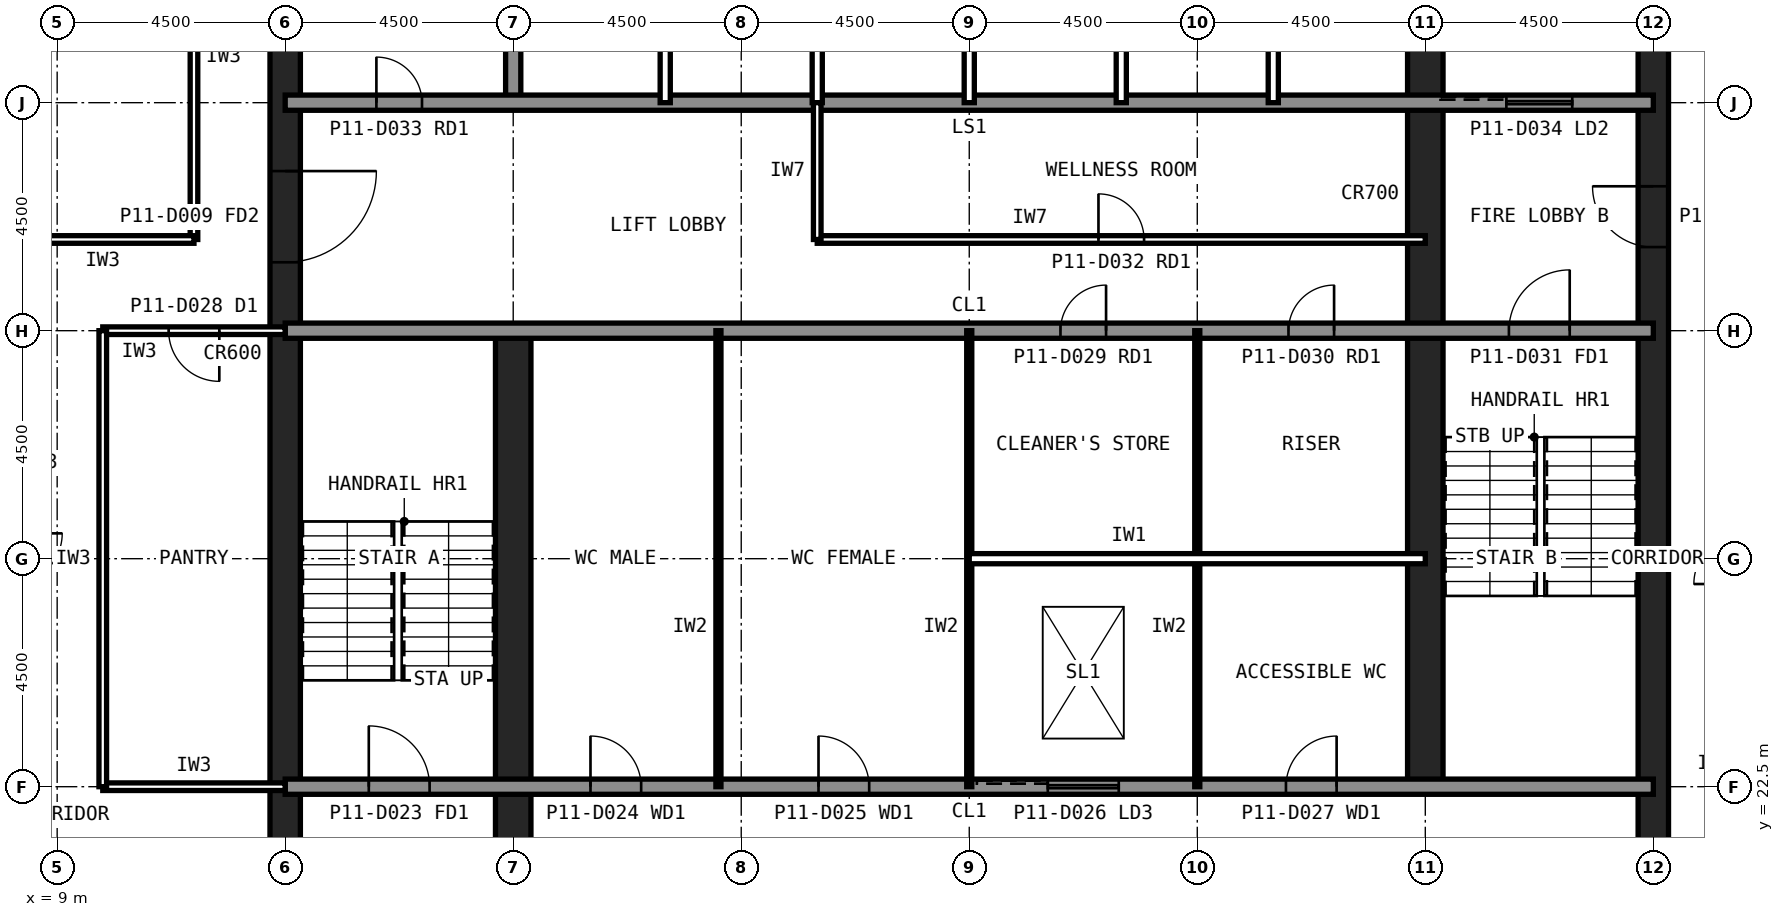
"""IFC4 building model, lengths in metres.
Left out: names, types, materials, properties, quantities, classifications, styles, units other than length and angle.
Written with IfcOpenShell. Run it as: python <this file> out.ifc"""

import sys

from ifc_helpers import new_model, si_unit, direction, frame, frame_2d, origin, place, context, subcontext, project, spatial, rectangle, extrude, element, fill, save


model = new_model("IFC4")
c1 = context("Model", 3, precision=1e-05, world=origin(), true_north=direction((0.0, 1.0)))
c2 = subcontext(c1, "Body", "Model", "MODEL_VIEW")
j1 = project(units=[si_unit("LENGTHUNIT", "METRE"), si_unit("PLANEANGLEUNIT", "RADIAN")], contexts=[c1])
p1 = place(None, origin())
s1 = spatial("IfcSite", under=j1, at=p1, CompositionType="ELEMENT")
p2 = place(p1, origin())
s2 = spatial("IfcBuilding", under=s1, at=p2, CompositionType="ELEMENT")
p3 = place(p2, frame((0.0, 0.0, 45.8)))
s3 = spatial("IfcBuildingStorey", under=s2, at=p3, CompositionType="ELEMENT", Elevation=45.8)
p4 = place(p3, frame((40.5, 13.5, 0.0), z_axis=(0.0, 0.0, 1.0), x_axis=(0.0, 1.0, 0.0)))
e1 = element("IfcWall", 1, at=p4, inside=s3, PredefinedType="SHEAR", context=c2, shape_type="SweptSolid", body=[
    extrude(rectangle(XDim=27.0, YDim=0.6, at=frame_2d((13.5, 0.0))), origin(), (0.0, 0.0, 1.0), 4.2),
])
p5 = place(p4, frame((5.85, 0.0, 0.0)))
e2 = element("IfcOpeningElement", 2, at=p5, cuts=e1, PredefinedType="OPENING", context=c2, shape_type="SweptSolid", body=[
    extrude(rectangle(XDim=1.8, YDim=2.1, at=frame_2d((0.9, 1.05))), frame((0.0, 0.31, 0.0), z_axis=(0.0, -1.0, 0.0), x_axis=(1.0, 0.0, 0.0)), (0.0, 0.0, 1.0), 0.62),
])
p6 = place(p4, frame((19.65, 0.0, 0.0)))
e3 = element("IfcOpeningElement", 3, at=p6, cuts=e1, PredefinedType="OPENING", context=c2, shape_type="SweptSolid", body=[
    extrude(rectangle(XDim=1.2, YDim=2.1, at=frame_2d((0.6, 1.05))), frame((0.0, 0.31, 0.0), z_axis=(0.0, -1.0, 0.0), x_axis=(1.0, 0.0, 0.0)), (0.0, 0.0, 1.0), 0.62),
])
p7 = place(p3, frame((13.5, 40.5, 0.0), z_axis=(0.0, 0.0, 1.0), x_axis=(0.0, -1.0, 0.0)))
e4 = element("IfcWall", 4, at=p7, inside=s3, PredefinedType="SHEAR", context=c2, shape_type="SweptSolid", body=[
    extrude(rectangle(XDim=27.0, YDim=0.6, at=frame_2d((13.5, 0.0))), origin(), (0.0, 0.0, 1.0), 4.2),
])
p8 = place(p7, frame((19.65, 0.0, 0.0)))
e5 = element("IfcOpeningElement", 5, at=p8, cuts=e4, PredefinedType="OPENING", context=c2, shape_type="SweptSolid", body=[
    extrude(rectangle(XDim=1.2, YDim=2.1, at=frame_2d((0.6, 1.05))), frame((0.0, 0.31, 0.0), z_axis=(0.0, -1.0, 0.0), x_axis=(1.0, 0.0, 0.0)), (0.0, 0.0, 1.0), 0.62),
])
p9 = place(p7, frame((5.85, 0.0, 0.0)))
e6 = element("IfcOpeningElement", 6, at=p9, cuts=e4, PredefinedType="OPENING", context=c2, shape_type="SweptSolid", body=[
    extrude(rectangle(XDim=1.8, YDim=2.1, at=frame_2d((0.9, 1.05))), frame((0.0, 0.31, 0.0), z_axis=(0.0, -1.0, 0.0), x_axis=(1.0, 0.0, 0.0)), (0.0, 0.0, 1.0), 0.62),
])
p10 = place(p3, frame((18.0, 13.5, 0.0), z_axis=(0.0, 0.0, 1.0), x_axis=(0.0, 1.0, 0.0)))
e7 = element("IfcWall", 7, at=p10, inside=s3, PredefinedType="SHEAR", context=c2, shape_type="SweptSolid", body=[
    extrude(rectangle(XDim=18.0, YDim=0.7, at=frame_2d((9.0, 0.0))), origin(), (0.0, 0.0, 1.0), 4.2),
])
p11 = place(p3, frame((18.0, 36.0, 0.0), z_axis=(0.0, 0.0, 1.0), x_axis=(0.0, 1.0, 0.0)))
e8 = element("IfcWall", 8, at=p11, inside=s3, PredefinedType="SOLIDWALL", context=c2, shape_type="SweptSolid", body=[
    extrude(rectangle(XDim=4.5, YDim=0.3, at=frame_2d((2.25, 0.0))), origin(), (0.0, 0.0, 1.0), 4.04),
])
p12 = place(p3, frame((36.0, 22.5, 0.0), z_axis=(0.0, 0.0, 1.0), x_axis=(0.0, 1.0, 0.0)))
e9 = element("IfcWall", 9, at=p12, inside=s3, PredefinedType="SHEAR", context=c2, shape_type="SweptSolid", body=[
    extrude(rectangle(XDim=18.0, YDim=0.7, at=frame_2d((9.0, 0.0))), origin(), (0.0, 0.0, 1.0), 4.2),
])
p13 = place(p3, frame((13.5, 36.0, 0.0), z_axis=(0.0, 0.0, 1.0), x_axis=(1.0, 0.0, 0.0)))
e10 = element("IfcWall", 10, at=p13, inside=s3, PredefinedType="SOLIDWALL", context=c2, shape_type="SweptSolid", body=[
    extrude(rectangle(XDim=27.0, YDim=0.3, at=frame_2d((13.5, 0.0))), origin(), (0.0, 0.0, 1.0), 4.04),
])
p14 = place(p13, frame((1.8, 0.0, 0.0)))
e11 = element("IfcOpeningElement", 11, at=p14, cuts=e10, PredefinedType="OPENING", context=c2, shape_type="SweptSolid", body=[
    extrude(rectangle(XDim=0.9, YDim=2.1, at=frame_2d((0.45, 1.05))), frame((0.0, 0.16, 0.0), z_axis=(0.0, -1.0, 0.0), x_axis=(1.0, 0.0, 0.0)), (0.0, 0.0, 1.0), 0.32),
])
p15 = place(p13, frame((24.1, 0.0, 0.0)))
e12 = element("IfcOpeningElement", 12, at=p15, cuts=e10, PredefinedType="OPENING", context=c2, shape_type="SweptSolid", body=[
    extrude(rectangle(XDim=1.3, YDim=2.2, at=frame_2d((0.65, 1.1))), frame((0.0, 0.16, 0.0), z_axis=(0.0, -1.0, 0.0), x_axis=(1.0, 0.0, 0.0)), (0.0, 0.0, 1.0), 0.32),
])
p16 = place(p3, frame((13.5, 22.5, 0.0), z_axis=(0.0, 0.0, 1.0), x_axis=(1.0, 0.0, 0.0)))
e13 = element("IfcWall", 13, at=p16, inside=s3, PredefinedType="SOLIDWALL", context=c2, shape_type="SweptSolid", body=[
    extrude(rectangle(XDim=27.0, YDim=0.3, at=frame_2d((13.5, 0.0))), origin(), (0.0, 0.0, 1.0), 4.04),
])
p17 = place(p16, frame((1.65, 0.0, 0.0)))
e14 = element("IfcOpeningElement", 14, at=p17, cuts=e13, PredefinedType="OPENING", context=c2, shape_type="SweptSolid", body=[
    extrude(rectangle(XDim=1.2, YDim=2.1, at=frame_2d((0.6, 1.05))), frame((0.0, 0.16, 0.0), z_axis=(0.0, -1.0, 0.0), x_axis=(1.0, 0.0, 0.0)), (0.0, 0.0, 1.0), 0.32),
])
p18 = place(p16, frame((6.025, 0.0, 0.0)))
e15 = element("IfcOpeningElement", 15, at=p18, cuts=e13, PredefinedType="OPENING", context=c2, shape_type="SweptSolid", body=[
    extrude(rectangle(XDim=1.0, YDim=2.1, at=frame_2d((0.5, 1.05))), frame((0.0, 0.16, 0.0), z_axis=(0.0, -1.0, 0.0), x_axis=(1.0, 0.0, 0.0)), (0.0, 0.0, 1.0), 0.32),
])
p19 = place(p16, frame((10.525, 0.0, 0.0)))
e16 = element("IfcOpeningElement", 16, at=p19, cuts=e13, PredefinedType="OPENING", context=c2, shape_type="SweptSolid", body=[
    extrude(rectangle(XDim=1.0, YDim=2.1, at=frame_2d((0.5, 1.05))), frame((0.0, 0.16, 0.0), z_axis=(0.0, -1.0, 0.0), x_axis=(1.0, 0.0, 0.0)), (0.0, 0.0, 1.0), 0.32),
])
p20 = place(p16, frame((19.75, 0.0, 0.0)))
e17 = element("IfcOpeningElement", 17, at=p20, cuts=e13, PredefinedType="OPENING", context=c2, shape_type="SweptSolid", body=[
    extrude(rectangle(XDim=1.0, YDim=2.1, at=frame_2d((0.5, 1.05))), frame((0.0, 0.16, 0.0), z_axis=(0.0, -1.0, 0.0), x_axis=(1.0, 0.0, 0.0)), (0.0, 0.0, 1.0), 0.32),
])
p21 = place(p16, frame((15.05, 0.0, 0.0)))
e18 = element("IfcOpeningElement", 18, at=p21, cuts=e13, PredefinedType="OPENING", context=c2, shape_type="SweptSolid", body=[
    extrude(rectangle(XDim=1.4, YDim=2.4, at=frame_2d((0.7, 1.2))), frame((0.0, 0.16, 0.0), z_axis=(0.0, -1.0, 0.0), x_axis=(1.0, 0.0, 0.0)), (0.0, 0.0, 1.0), 0.32),
])
p22 = place(p3, frame((13.5, 31.5, 0.0), z_axis=(0.0, 0.0, 1.0), x_axis=(1.0, 0.0, 0.0)))
e19 = element("IfcWall", 19, at=p22, inside=s3, PredefinedType="SOLIDWALL", context=c2, shape_type="SweptSolid", body=[
    extrude(rectangle(XDim=27.0, YDim=0.3, at=frame_2d((13.5, 0.0))), origin(), (0.0, 0.0, 1.0), 4.04),
])
p23 = place(p22, frame((24.15, 0.0, 0.0)))
e20 = element("IfcOpeningElement", 20, at=p23, cuts=e19, PredefinedType="OPENING", context=c2, shape_type="SweptSolid", body=[
    extrude(rectangle(XDim=1.2, YDim=2.1, at=frame_2d((0.6, 1.05))), frame((0.0, 0.16, 0.0), z_axis=(0.0, -1.0, 0.0), x_axis=(1.0, 0.0, 0.0)), (0.0, 0.0, 1.0), 0.32),
])
p24 = place(p22, frame((15.3, 0.0, 0.0)))
e21 = element("IfcOpeningElement", 21, at=p24, cuts=e19, PredefinedType="OPENING", context=c2, shape_type="SweptSolid", body=[
    extrude(rectangle(XDim=0.9, YDim=2.1, at=frame_2d((0.45, 1.05))), frame((0.0, 0.16, 0.0), z_axis=(0.0, -1.0, 0.0), x_axis=(1.0, 0.0, 0.0)), (0.0, 0.0, 1.0), 0.32),
])
p25 = place(p22, frame((19.8, 0.0, 0.0)))
e22 = element("IfcOpeningElement", 22, at=p25, cuts=e19, PredefinedType="OPENING", context=c2, shape_type="SweptSolid", body=[
    extrude(rectangle(XDim=0.9, YDim=2.1, at=frame_2d((0.45, 1.05))), frame((0.0, 0.16, 0.0), z_axis=(0.0, -1.0, 0.0), x_axis=(1.0, 0.0, 0.0)), (0.0, 0.0, 1.0), 0.32),
])
for number, where, z_axis, x_axis in (
    (23, (21.0, 36.0, 0.0), (0.0, 0.0, 1.0), (0.0, 1.0, 0.0)),
    (24, (24.0, 36.0, 0.0), (0.0, 0.0, 1.0), (0.0, 1.0, 0.0)),
    (25, (27.0, 36.0, 0.0), (0.0, 0.0, 1.0), (0.0, 1.0, 0.0)),
    (26, (30.0, 36.0, 0.0), (0.0, 0.0, 1.0), (0.0, 1.0, 0.0)),
    (27, (33.0, 36.0, 0.0), (0.0, 0.0, 1.0), (0.0, 1.0, 0.0)),
):
    element("IfcWall", number, at=place(p3, frame(where, z_axis=z_axis, x_axis=x_axis)), inside=s3, PredefinedType="PARTITIONING", context=c2, shape_type="SweptSolid", body=[
        extrude(rectangle(XDim=4.5, YDim=0.2, at=frame_2d((2.25, 0.0))), origin(), (0.0, 0.0, 1.0), 4.04),
    ])
for number, where, z_axis, x_axis in (
    (28, (22.05, 22.5, 0.0), (0.0, 0.0, 1.0), (0.0, 1.0, 0.0)),
    (29, (27.0, 22.5, 0.0), (0.0, 0.0, 1.0), (0.0, 1.0, 0.0)),
    (30, (31.5, 22.5, 0.0), (0.0, 0.0, 1.0), (0.0, 1.0, 0.0)),
):
    element("IfcWall", number, at=place(p3, frame(where, z_axis=z_axis, x_axis=x_axis)), inside=s3, PredefinedType="PLUMBINGWALL", context=c2, shape_type="SweptSolid", body=[
        extrude(rectangle(XDim=9.0, YDim=0.1, at=frame_2d((4.5, 0.0))), origin(), (0.0, 0.0, 1.0), 4.04),
    ])
p26 = place(p3, frame((27.0, 27.0, 0.0), z_axis=(0.0, 0.0, 1.0), x_axis=(1.0, 0.0, 0.0)))
e31 = element("IfcWall", 31, at=p26, inside=s3, PredefinedType="PARTITIONING", context=c2, shape_type="SweptSolid", body=[
    extrude(rectangle(XDim=9.0, YDim=0.2, at=frame_2d((4.5, 0.0))), origin(), (0.0, 0.0, 1.0), 4.04),
])
p27 = place(p3, frame((18.0, 33.3, 0.0), z_axis=(0.0, 0.0, 1.0), x_axis=(1.0, 0.0, 0.0)))
e32 = element("IfcWall", 32, at=p27, inside=s3, PredefinedType="PARTITIONING", context=c2, shape_type="SweptSolid", body=[
    extrude(rectangle(XDim=18.0, YDim=0.15, at=frame_2d((9.0, 0.0))), origin(), (0.0, 0.0, 1.0), 4.04),
])
p28 = place(p27, frame((1.8, 0.0, 0.0)))
e33 = element("IfcOpeningElement", 33, at=p28, cuts=e32, PredefinedType="OPENING", context=c2, shape_type="SweptSolid", body=[
    extrude(rectangle(XDim=0.9, YDim=2.1, at=frame_2d((0.45, 1.05))), frame((0.0, 0.085, 0.0), z_axis=(0.0, -1.0, 0.0), x_axis=(1.0, 0.0, 0.0)), (0.0, 0.0, 1.0), 0.17),
])
p29 = place(p27, frame((7.8, 0.0, 0.0)))
e34 = element("IfcOpeningElement", 34, at=p29, cuts=e32, PredefinedType="OPENING", context=c2, shape_type="SweptSolid", body=[
    extrude(rectangle(XDim=0.9, YDim=2.1, at=frame_2d((0.45, 1.05))), frame((0.0, 0.085, 0.0), z_axis=(0.0, -1.0, 0.0), x_axis=(1.0, 0.0, 0.0)), (0.0, 0.0, 1.0), 0.17),
])
p30 = place(p27, frame((14.55, 0.0, 0.0)))
e35 = element("IfcOpeningElement", 35, at=p30, cuts=e32, PredefinedType="OPENING", context=c2, shape_type="SweptSolid", body=[
    extrude(rectangle(XDim=0.9, YDim=2.1, at=frame_2d((0.45, 1.05))), frame((0.0, 0.085, 0.0), z_axis=(0.0, -1.0, 0.0), x_axis=(1.0, 0.0, 0.0)), (0.0, 0.0, 1.0), 0.17),
])
for number, where, z_axis, x_axis in (
    (36, (18.0, 33.3, 0.0), (0.0, 0.0, 1.0), (0.0, 1.0, 0.0)),
    (37, (22.5, 33.3, 0.0), (0.0, 0.0, 1.0), (0.0, 1.0, 0.0)),
    (38, (30.0, 33.3, 0.0), (0.0, 0.0, 1.0), (0.0, 1.0, 0.0)),
):
    element("IfcWall", number, at=place(p3, frame(where, z_axis=z_axis, x_axis=x_axis)), inside=s3, PredefinedType="PARTITIONING", context=c2, shape_type="SweptSolid", body=[
        extrude(rectangle(XDim=2.7, YDim=0.15, at=frame_2d((1.35, 0.0))), origin(), (0.0, 0.0, 1.0), 4.04),
    ])
p31 = place(p3, frame((11.7, 42.3, 0.0), z_axis=(0.0, 0.0, 1.0), x_axis=(0.0, -1.0, 0.0)))
e39 = element("IfcWall", 39, at=p31, inside=s3, PredefinedType="PARTITIONING", context=c2, shape_type="SweptSolid", body=[
    extrude(rectangle(XDim=9.0, YDim=0.15, at=frame_2d((4.5, 0.0))), origin(), (0.0, 0.0, 1.0), 4.04),
])
p32 = place(p3, frame((11.7, 33.3, 0.0), z_axis=(0.0, 0.0, 1.0), x_axis=(-1.0, 0.0, 0.0)))
e40 = element("IfcWall", 40, at=p32, inside=s3, PredefinedType="PARTITIONING", context=c2, shape_type="SweptSolid", body=[
    extrude(rectangle(XDim=3.6, YDim=0.15, at=frame_2d((1.8, 0.0))), origin(), (0.0, 0.0, 1.0), 4.04),
])
p33 = place(p3, frame((9.9, 22.5, 0.0), z_axis=(0.0, 0.0, 1.0), x_axis=(1.0, 0.0, 0.0)))
e41 = element("IfcWall", 41, at=p33, inside=s3, PredefinedType="PARTITIONING", context=c2, shape_type="SweptSolid", body=[
    extrude(rectangle(XDim=3.6, YDim=0.15, at=frame_2d((1.8, 0.0))), origin(), (0.0, 0.0, 1.0), 3.189),
])
p34 = place(p3, frame((13.5, 31.5, 0.0), z_axis=(0.0, 0.0, 1.0), x_axis=(-1.0, 0.0, 0.0)))
e42 = element("IfcWall", 42, at=p34, inside=s3, PredefinedType="PARTITIONING", context=c2, shape_type="SweptSolid", body=[
    extrude(rectangle(XDim=3.6, YDim=0.15, at=frame_2d((1.8, 0.0))), origin(), (0.0, 0.0, 1.0), 3.189),
])
p35 = place(p34, frame((1.3, 0.0, 0.0)))
e43 = element("IfcOpeningElement", 43, at=p35, cuts=e42, PredefinedType="OPENING", context=c2, shape_type="SweptSolid", body=[
    extrude(rectangle(XDim=1.0, YDim=2.1, at=frame_2d((0.5, 1.05))), frame((0.0, 0.085, 0.0), z_axis=(0.0, -1.0, 0.0), x_axis=(1.0, 0.0, 0.0)), (0.0, 0.0, 1.0), 0.17),
])
p36 = place(p3, frame((9.9, 31.5, 0.0), z_axis=(0.0, 0.0, 1.0), x_axis=(0.0, -1.0, 0.0)))
e44 = element("IfcWall", 44, at=p36, inside=s3, PredefinedType="PARTITIONING", context=c2, shape_type="SweptSolid", body=[
    extrude(rectangle(XDim=9.0, YDim=0.15, at=frame_2d((4.5, 0.0))), origin(), (0.0, 0.0, 1.0), 4.04),
])
p37 = place(p9, origin())
e45 = element("IfcDoor", 45, at=p37, inside=s3, OperationType="SINGLE_SWING_LEFT", PredefinedType="DOOR", context=c2, shape_type="SweptSolid", body=[
    extrude(rectangle(XDim=1.8, YDim=2.1, at=frame_2d((0.9, 1.05))), frame((0.0, 0.025, 0.0), z_axis=(0.0, -1.0, 0.0), x_axis=(1.0, 0.0, 0.0)), (0.0, 0.0, 1.0), 0.05),
])
fill(e6, e45)
p38 = place(p6, origin())
e46 = element("IfcDoor", 46, at=p38, inside=s3, OperationType="SINGLE_SWING_RIGHT", PredefinedType="DOOR", context=c2, shape_type="SweptSolid", body=[
    extrude(rectangle(XDim=1.2, YDim=2.1, at=frame_2d((0.6, 1.05))), frame((0.0, 0.025, 0.0), z_axis=(0.0, -1.0, 0.0), x_axis=(1.0, 0.0, 0.0)), (0.0, 0.0, 1.0), 0.05),
])
fill(e3, e46)
p39 = place(p17, origin())
e47 = element("IfcDoor", 47, at=p39, inside=s3, OperationType="SINGLE_SWING_LEFT", PredefinedType="DOOR", context=c2, shape_type="SweptSolid", body=[
    extrude(rectangle(XDim=1.2, YDim=2.1, at=frame_2d((0.6, 1.05))), frame((0.0, 0.025, 0.0), z_axis=(0.0, -1.0, 0.0), x_axis=(1.0, 0.0, 0.0)), (0.0, 0.0, 1.0), 0.05),
])
fill(e14, e47)
p40 = place(p23, origin())
e48 = element("IfcDoor", 48, at=p40, inside=s3, OperationType="SINGLE_SWING_RIGHT", PredefinedType="DOOR", context=c2, shape_type="SweptSolid", body=[
    extrude(rectangle(XDim=1.2, YDim=2.1, at=frame_2d((0.6, 1.05))), frame((0.0, 0.025, 0.0), z_axis=(0.0, -1.0, 0.0), x_axis=(1.0, 0.0, 0.0)), (0.0, 0.0, 1.0), 0.05),
])
fill(e20, e48)
p41 = place(p18, origin())
e49 = element("IfcDoor", 49, at=p41, inside=s3, OperationType="SINGLE_SWING_LEFT", PredefinedType="DOOR", context=c2, shape_type="SweptSolid", body=[
    extrude(rectangle(XDim=1.0, YDim=2.1, at=frame_2d((0.5, 1.05))), frame((0.0, 0.025, 0.0), z_axis=(0.0, -1.0, 0.0), x_axis=(1.0, 0.0, 0.0)), (0.0, 0.0, 1.0), 0.05),
])
fill(e15, e49)
p42 = place(p19, origin())
e50 = element("IfcDoor", 50, at=p42, inside=s3, OperationType="SINGLE_SWING_LEFT", PredefinedType="DOOR", context=c2, shape_type="SweptSolid", body=[
    extrude(rectangle(XDim=1.0, YDim=2.1, at=frame_2d((0.5, 1.05))), frame((0.0, 0.025, 0.0), z_axis=(0.0, -1.0, 0.0), x_axis=(1.0, 0.0, 0.0)), (0.0, 0.0, 1.0), 0.05),
])
fill(e16, e50)
p43 = place(p20, origin())
e51 = element("IfcDoor", 51, at=p43, inside=s3, OperationType="SINGLE_SWING_RIGHT", PredefinedType="DOOR", context=c2, shape_type="SweptSolid", body=[
    extrude(rectangle(XDim=1.0, YDim=2.1, at=frame_2d((0.5, 1.05))), frame((0.0, 0.025, 0.0), z_axis=(0.0, -1.0, 0.0), x_axis=(1.0, 0.0, 0.0)), (0.0, 0.0, 1.0), 0.05),
])
fill(e17, e51)
p44 = place(p24, origin())
e52 = element("IfcDoor", 52, at=p44, inside=s3, OperationType="SINGLE_SWING_RIGHT", PredefinedType="DOOR", context=c2, shape_type="SweptSolid", body=[
    extrude(rectangle(XDim=0.9, YDim=2.1, at=frame_2d((0.45, 1.05))), frame((0.0, 0.025, 0.0), z_axis=(0.0, -1.0, 0.0), x_axis=(1.0, 0.0, 0.0)), (0.0, 0.0, 1.0), 0.05),
])
fill(e21, e52)
p45 = place(p25, origin())
e53 = element("IfcDoor", 53, at=p45, inside=s3, OperationType="SINGLE_SWING_RIGHT", PredefinedType="DOOR", context=c2, shape_type="SweptSolid", body=[
    extrude(rectangle(XDim=0.9, YDim=2.1, at=frame_2d((0.45, 1.05))), frame((0.0, 0.025, 0.0), z_axis=(0.0, -1.0, 0.0), x_axis=(1.0, 0.0, 0.0)), (0.0, 0.0, 1.0), 0.05),
])
fill(e22, e53)
p46 = place(p14, origin())
e54 = element("IfcDoor", 54, at=p46, inside=s3, OperationType="SINGLE_SWING_LEFT", PredefinedType="DOOR", context=c2, shape_type="SweptSolid", body=[
    extrude(rectangle(XDim=0.9, YDim=2.1, at=frame_2d((0.45, 1.05))), frame((0.0, 0.025, 0.0), z_axis=(0.0, -1.0, 0.0), x_axis=(1.0, 0.0, 0.0)), (0.0, 0.0, 1.0), 0.05),
])
fill(e11, e54)
p47 = place(p28, origin())
e55 = element("IfcDoor", 55, at=p47, inside=s3, OperationType="SINGLE_SWING_LEFT", PredefinedType="DOOR", context=c2, shape_type="SweptSolid", body=[
    extrude(rectangle(XDim=0.9, YDim=2.1, at=frame_2d((0.45, 1.05))), frame((0.0, 0.025, 0.0), z_axis=(0.0, -1.0, 0.0), x_axis=(1.0, 0.0, 0.0)), (0.0, 0.0, 1.0), 0.05),
])
fill(e33, e55)
p48 = place(p29, origin())
e56 = element("IfcDoor", 56, at=p48, inside=s3, OperationType="SINGLE_SWING_LEFT", PredefinedType="DOOR", context=c2, shape_type="SweptSolid", body=[
    extrude(rectangle(XDim=0.9, YDim=2.1, at=frame_2d((0.45, 1.05))), frame((0.0, 0.025, 0.0), z_axis=(0.0, -1.0, 0.0), x_axis=(1.0, 0.0, 0.0)), (0.0, 0.0, 1.0), 0.05),
])
fill(e34, e56)
p49 = place(p30, origin())
e57 = element("IfcDoor", 57, at=p49, inside=s3, OperationType="SINGLE_SWING_RIGHT", PredefinedType="DOOR", context=c2, shape_type="SweptSolid", body=[
    extrude(rectangle(XDim=0.9, YDim=2.1, at=frame_2d((0.45, 1.05))), frame((0.0, 0.025, 0.0), z_axis=(0.0, -1.0, 0.0), x_axis=(1.0, 0.0, 0.0)), (0.0, 0.0, 1.0), 0.05),
])
fill(e35, e57)
p50 = place(p15, origin())
e58 = element("IfcDoor", 58, at=p50, inside=s3, OperationType="SLIDING_TO_LEFT", PredefinedType="DOOR", context=c2, shape_type="SweptSolid", body=[
    extrude(rectangle(XDim=1.3, YDim=2.2, at=frame_2d((0.65, 1.1))), frame((0.0, 0.025, 0.0), z_axis=(0.0, -1.0, 0.0), x_axis=(1.0, 0.0, 0.0)), (0.0, 0.0, 1.0), 0.05),
])
fill(e12, e58)
p51 = place(p21, origin())
e59 = element("IfcDoor", 59, at=p51, inside=s3, OperationType="SLIDING_TO_LEFT", PredefinedType="DOOR", context=c2, shape_type="SweptSolid", body=[
    extrude(rectangle(XDim=1.4, YDim=2.4, at=frame_2d((0.7, 1.2))), frame((0.0, 0.025, 0.0), z_axis=(0.0, -1.0, 0.0), x_axis=(1.0, 0.0, 0.0)), (0.0, 0.0, 1.0), 0.05),
])
fill(e18, e59)
p52 = place(p35, origin())
e60 = element("IfcDoor", 60, at=p52, inside=s3, OperationType="SINGLE_SWING_LEFT", PredefinedType="DOOR", context=c2, shape_type="SweptSolid", body=[
    extrude(rectangle(XDim=1.0, YDim=2.1, at=frame_2d((0.5, 1.05))), frame((0.0, 0.025, 0.0), z_axis=(0.0, -1.0, 0.0), x_axis=(1.0, 0.0, 0.0)), (0.0, 0.0, 1.0), 0.05),
])
fill(e43, e60)
save(model, sys.argv[1])
